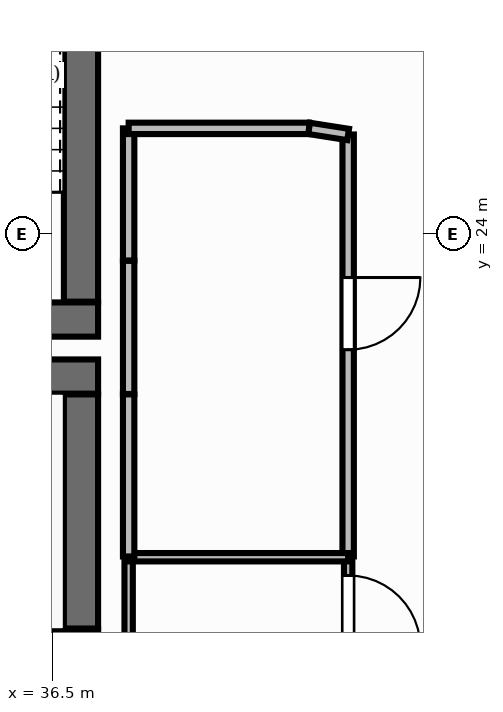
"""IFC4 building model, lengths in metres.
Left out: names, types, materials, properties, quantities, classifications, styles, units other than length and angle.
Written with IfcOpenShell. Run it as: python <this file> out.ifc"""

import sys

from ifc_helpers import new_model, si_unit, direction, frame, frame_2d, origin, place, context, subcontext, project, spatial, rectangle, extrude, element, fill, save


model = new_model("IFC4")
c1 = context("Model", 3, precision=1e-05, world=origin(), true_north=direction((0.0, 1.0)))
c2 = subcontext(c1, "Body", "Model", "MODEL_VIEW")
j1 = project(units=[si_unit("LENGTHUNIT", "METRE"), si_unit("PLANEANGLEUNIT", "RADIAN")], contexts=[c1])
p1 = place(None, origin())
s1 = spatial("IfcSite", under=j1, at=p1, CompositionType="ELEMENT")
p2 = place(p1, origin())
s2 = spatial("IfcBuilding", under=s1, at=p2, CompositionType="ELEMENT")
p3 = place(p2, frame((0.0, 0.0, 119.4)))
s3 = spatial("IfcBuildingStorey", under=s2, at=p3, CompositionType="ELEMENT", Elevation=119.4)
p4 = place(p3, frame((28.852, 18.575, 0.0), z_axis=(0.0, 0.0, 1.0), x_axis=(1.0, 0.0, 0.0)))
e1 = element("IfcWall", 1, at=p4, inside=s3, PredefinedType="SHEAR", context=c2, shape_type="SweptSolid", body=[
    extrude(rectangle(XDim=8.248, YDim=0.45, at=frame_2d((4.124, 0.0))), origin(), (0.0, 0.0, 1.0), 3.9),
])
p5 = place(p3, frame((28.35, 22.125, 0.0), z_axis=(0.0, 0.0, 1.0), x_axis=(1.0, 0.0, 0.0)))
e2 = element("IfcWall", 2, at=p5, inside=s3, PredefinedType="SHEAR", context=c2, shape_type="SweptSolid", body=[
    extrude(rectangle(XDim=8.75, YDim=0.45, at=frame_2d((4.375, 0.0))), origin(), (0.0, 0.0, 1.0), 3.9),
])
p6 = place(p3, frame((36.875, 18.81, 0.0), z_axis=(0.0, 0.0, 1.0), x_axis=(0.0, 1.0, 0.0)))
e3 = element("IfcWall", 3, at=p6, inside=s3, PredefinedType="SHEAR", context=c2, shape_type="SweptSolid", body=[
    extrude(rectangle(XDim=3.08, YDim=0.45, at=frame_2d((1.54, 0.0))), origin(), (0.0, 0.0, 1.0), 3.9),
])
p7 = place(p3, frame((33.1, 22.875, 0.0), z_axis=(0.0, 0.0, 1.0), x_axis=(1.0, 0.0, 0.0)))
e4 = element("IfcWall", 4, at=p7, inside=s3, PredefinedType="SHEAR", context=c2, shape_type="SweptSolid", body=[
    extrude(rectangle(XDim=4.0, YDim=0.45, at=frame_2d((2.0, 0.0))), origin(), (0.0, 0.0, 1.0), 3.9),
])
p8 = place(p3, frame((36.875, 23.11, 0.0), z_axis=(0.0, 0.0, 1.0), x_axis=(0.0, 1.0, 0.0)))
e5 = element("IfcWall", 5, at=p8, inside=s3, PredefinedType="SHEAR", context=c2, shape_type="SweptSolid", body=[
    extrude(rectangle(XDim=7.78, YDim=0.45, at=frame_2d((3.89, 0.0))), origin(), (0.0, 0.0, 1.0), 3.9),
])
p9 = place(p3, frame((40.39, 19.748, 0.0), z_axis=(0.0, 0.0, 1.0), x_axis=(0.0, -1.0, 0.0)))
e6 = element("IfcWall", 6, at=p9, inside=s3, PredefinedType="MOVABLE", context=c2, shape_type="SweptSolid", body=[
    extrude(rectangle(XDim=3.248, YDim=0.11, at=frame_2d((1.624, 0.0))), origin(), (0.0, 0.0, 1.0), 2.91),
])
p10 = place(p9, frame((0.24, 0.0, 0.0)))
e7 = element("IfcOpeningElement", 7, at=p10, cuts=e6, PredefinedType="OPENING", context=c2, shape_type="SweptSolid", body=[
    extrude(rectangle(XDim=0.95, YDim=2.15, at=frame_2d((0.475, 1.075))), frame((0.0, 0.07, 0.0), z_axis=(0.0, -1.0, 0.0), x_axis=(1.0, 0.0, 0.0)), (0.0, 0.0, 1.0), 0.14),
])
p11 = place(p3, frame((40.39, 25.31, 0.0), z_axis=(0.0, 0.0, 1.0), x_axis=(0.0, -1.0, 0.0)))
e8 = element("IfcWall", 8, at=p11, inside=s3, PredefinedType="PARTITIONING", context=c2, shape_type="SweptSolid", body=[
    extrude(rectangle(XDim=5.552, YDim=0.15, at=frame_2d((2.776, 0.0))), origin(), (0.0, 0.0, 1.0), 2.91),
])
p12 = place(p11, frame((1.882, 0.0, 0.0)))
e9 = element("IfcOpeningElement", 9, at=p12, cuts=e8, PredefinedType="OPENING", context=c2, shape_type="SweptSolid", body=[
    extrude(rectangle(XDim=0.95, YDim=2.15, at=frame_2d((0.475, 1.075))), frame((0.0, 0.09, 0.0), z_axis=(0.0, -1.0, 0.0), x_axis=(1.0, 0.0, 0.0)), (0.0, 0.0, 1.0), 0.18),
])
p13 = place(p3, frame((37.502, 17.397, 0.0), z_axis=(0.0, 0.0, 1.0), x_axis=(0.0, 1.0, 0.0)))
e10 = element("IfcWall", 10, at=p13, inside=s3, PredefinedType="MOVABLE", context=c2, shape_type="SweptSolid", body=[
    extrude(rectangle(XDim=2.351, YDim=0.11, at=frame_2d((1.175, 0.0))), origin(), (0.0, 0.0, 1.0), 2.91),
])
p14 = place(p3, frame((37.502, 19.748, 0.0), z_axis=(0.0, 0.0, 1.0), x_axis=(1.0, 0.0, 0.0)))
e11 = element("IfcWall", 11, at=p14, inside=s3, PredefinedType="MOVABLE", context=c2, shape_type="SweptSolid", body=[
    extrude(rectangle(XDim=2.888, YDim=0.11, at=frame_2d((1.444, 0.0))), origin(), (0.0, 0.0, 1.0), 2.91),
])
p15 = place(p3, frame((37.502, 21.896, 0.0), z_axis=(0.0, 0.0, 1.0), x_axis=(0.0, 1.0, 0.0)))
e12 = element("IfcWall", 12, at=p15, inside=s3, PredefinedType="PARTITIONING", context=c2, shape_type="SweptSolid", body=[
    extrude(rectangle(XDim=1.752, YDim=0.15, at=frame_2d((0.876, 0.0))), origin(), (0.0, 0.0, 1.0), 2.91),
])
p16 = place(p3, frame((37.502, 23.652, 0.0), z_axis=(0.0, 0.0, 1.0), x_axis=(0.0, 1.0, 0.0)))
e13 = element("IfcWall", 13, at=p16, inside=s3, PredefinedType="PARTITIONING", context=c2, shape_type="SweptSolid", body=[
    extrude(rectangle(XDim=1.738, YDim=0.15, at=frame_2d((0.869, 0.0))), origin(), (0.0, 0.0, 1.0), 2.91),
])
p17 = place(p3, frame((37.502, 25.39, 0.0), z_axis=(0.0, 0.0, 1.0), x_axis=(1.0, 0.0, 0.0)))
e14 = element("IfcWall", 14, at=p17, inside=s3, PredefinedType="PARTITIONING", context=c2, shape_type="SweptSolid", body=[
    extrude(rectangle(XDim=2.374, YDim=0.15, at=frame_2d((1.187, 0.0))), origin(), (0.0, 0.0, 1.0), 2.91),
])
p18 = place(p3, frame((39.876, 25.39, 0.0), z_axis=(0.0, 0.0, 1.0), x_axis=(0.988005321265, -0.15441983406, 0.0)))
e15 = element("IfcWall", 15, at=p18, inside=s3, PredefinedType="PARTITIONING", context=c2, shape_type="SweptSolid", body=[
    extrude(rectangle(XDim=0.52, YDim=0.15, at=frame_2d((0.26, 0.0))), origin(), (0.0, 0.0, 1.0), 2.91),
])
p19 = place(p3, frame((37.502, 19.758, 0.0), z_axis=(0.0, 0.0, 1.0), x_axis=(0.0, 1.0, 0.0)))
e16 = element("IfcWall", 16, at=p19, inside=s3, PredefinedType="PARTITIONING", context=c2, shape_type="SweptSolid", body=[
    extrude(rectangle(XDim=2.132, YDim=0.15, at=frame_2d((1.066, 0.0))), origin(), (0.0, 0.0, 1.0), 2.91),
])
p20 = place(p10, origin())
e17 = element("IfcDoor", 17, at=p20, inside=s3, OperationType="SINGLE_SWING_RIGHT", PredefinedType="DOOR", context=c2, shape_type="SweptSolid", body=[
    extrude(rectangle(XDim=0.95, YDim=2.15, at=frame_2d((0.475, 1.075))), frame((0.0, 0.025, 0.0), z_axis=(0.0, -1.0, 0.0), x_axis=(1.0, 0.0, 0.0)), (0.0, 0.0, 1.0), 0.05),
])
fill(e7, e17)
p21 = place(p12, origin())
e18 = element("IfcDoor", 18, at=p21, inside=s3, OperationType="SINGLE_SWING_LEFT", PredefinedType="DOOR", context=c2, shape_type="SweptSolid", body=[
    extrude(rectangle(XDim=0.95, YDim=2.15, at=frame_2d((0.475, 1.075))), frame((0.0, 0.025, 0.0), z_axis=(0.0, -1.0, 0.0), x_axis=(1.0, 0.0, 0.0)), (0.0, 0.0, 1.0), 0.05),
])
fill(e9, e18)
save(model, sys.argv[1])
